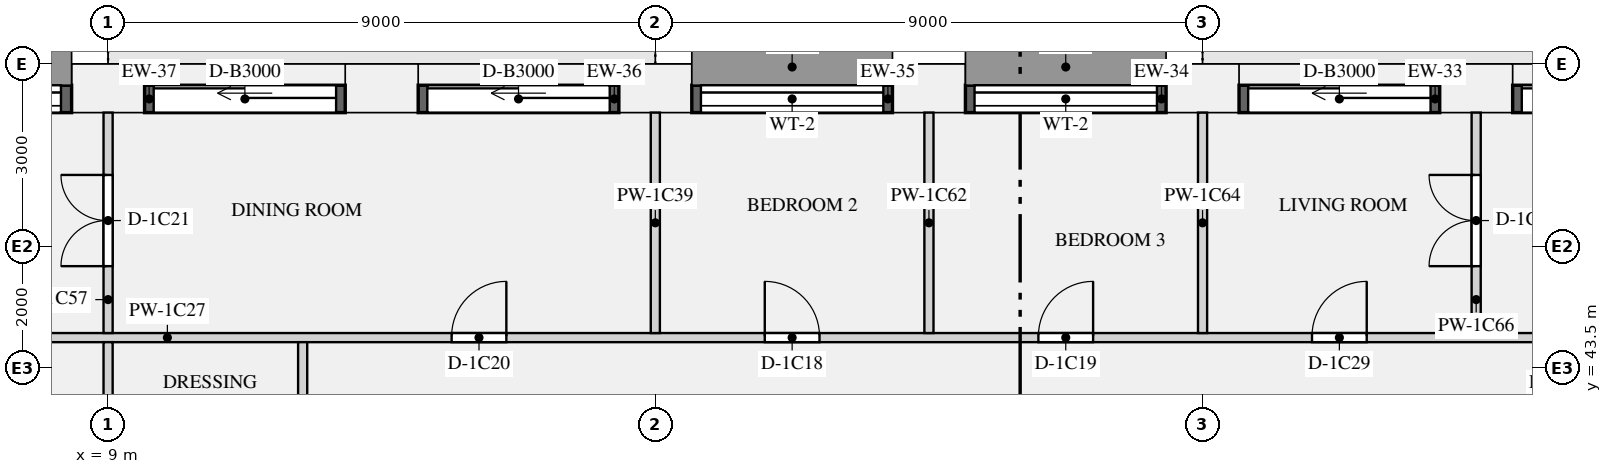
"""IFC4 building model, lengths in metres.
Left out: names, types, materials, properties, quantities, classifications, styles, units other than length and angle.
Written with IfcOpenShell. Run it as: python <this file> out.ifc"""

import sys

from ifc_helpers import new_model, si_unit, direction, frame, frame_2d, origin, origin_2d, place, context, subcontext, project, spatial, rectangle, extrude, element, fill, save


model = new_model("IFC4")
c1 = context("Model", 3, precision=1e-05, world=origin(), true_north=direction((0.0, 1.0)))
c2 = subcontext(c1, "Body", "Model", "MODEL_VIEW")
j1 = project(units=[si_unit("LENGTHUNIT", "METRE"), si_unit("PLANEANGLEUNIT", "RADIAN")], contexts=[c1])
p1 = place(None, origin())
s1 = spatial("IfcSite", under=j1, at=p1, CompositionType="ELEMENT")
p2 = place(p1, origin())
s2 = spatial("IfcBuilding", under=s1, at=p2, CompositionType="ELEMENT")
p3 = place(p2, frame((0.0, 0.0, 38.4)))
s3 = spatial("IfcBuildingStorey", under=s2, at=p3, CompositionType="ELEMENT", Elevation=38.4)
for number, where, z_axis, x_axis in (
    (1, (31.5, 48.1, 0.0), (0.0, 0.0, 1.0), (-1.0, 0.0, 0.0)),
    (2, (27.0, 48.1, 0.0), (0.0, 0.0, 1.0), (-1.0, 0.0, 0.0)),
    (3, (22.5, 48.1, 0.0), (0.0, 0.0, 1.0), (-1.0, 0.0, 0.0)),
    (4, (18.0, 48.1, 0.0), (0.0, 0.0, 1.0), (-1.0, 0.0, 0.0)),
    (5, (13.5, 48.1, 0.0), (0.0, 0.0, 1.0), (-1.0, 0.0, 0.0)),
    (6, (9.0, 48.1, 0.0), (0.0, 0.0, 1.0), (-1.0, 0.0, 0.0)),
):
    element("IfcColumn", number, at=place(p3, frame(where, z_axis=z_axis, x_axis=x_axis)), inside=s3, PredefinedType="USERDEFINED", context=c2, shape_type="SweptSolid", body=[
        extrude(rectangle(XDim=1.2, YDim=0.8, at=origin_2d()), origin(), (0.0, 0.0, 1.0), 3.15),
    ])
p4 = place(p3, frame((35.4, 47.925, 0.0), z_axis=(0.0, 0.0, 1.0), x_axis=(-1.0, 0.0, 0.0)))
e7 = element("IfcWall", 7, at=p4, inside=s3, PredefinedType="SOLIDWALL", context=c2, shape_type="SweptSolid", body=[
    extrude(rectangle(XDim=3.3, YDim=0.45, at=frame_2d((1.65, 0.0))), origin(), (0.0, 0.0, 1.0), 2.83),
])
p5 = place(p4, frame((0.15, 0.0, 0.0)))
e8 = element("IfcOpeningElement", 8, at=p5, cuts=e7, PredefinedType="OPENING", context=c2, shape_type="SweptSolid", body=[
    extrude(rectangle(XDim=3.0, YDim=2.3, at=frame_2d((1.5, 1.15))), frame((0.0, 0.235, 0.0), z_axis=(0.0, -1.0, 0.0), x_axis=(1.0, 0.0, 0.0)), (0.0, 0.0, 1.0), 0.47),
])
p6 = place(p3, frame((30.9, 47.925, 0.0), z_axis=(0.0, 0.0, 1.0), x_axis=(-1.0, 0.0, 0.0)))
e9 = element("IfcWall", 9, at=p6, inside=s3, PredefinedType="SOLIDWALL", context=c2, shape_type="SweptSolid", body=[
    extrude(rectangle(XDim=3.3, YDim=0.45, at=frame_2d((1.65, 0.0))), origin(), (0.0, 0.0, 1.0), 2.83),
])
p7 = place(p6, frame((0.15, 0.0, 0.0)))
e10 = element("IfcOpeningElement", 10, at=p7, cuts=e9, PredefinedType="OPENING", context=c2, shape_type="SweptSolid", body=[
    extrude(rectangle(XDim=3.0, YDim=2.3, at=frame_2d((1.5, 1.15))), frame((0.0, 0.235, 0.0), z_axis=(0.0, -1.0, 0.0), x_axis=(1.0, 0.0, 0.0)), (0.0, 0.0, 1.0), 0.47),
])
p8 = place(p3, frame((26.4, 47.925, 0.9), z_axis=(0.0, 0.0, 1.0), x_axis=(-1.0, 0.0, 0.0)))
e11 = element("IfcWall", 11, at=p8, inside=s3, PredefinedType="SOLIDWALL", context=c2, shape_type="SweptSolid", body=[
    extrude(rectangle(XDim=3.3, YDim=0.45, at=frame_2d((1.65, 0.0))), origin(), (0.0, 0.0, 1.0), 1.93),
])
p9 = place(p8, frame((0.15, 0.0, 0.15)))
e12 = element("IfcOpeningElement", 12, at=p9, cuts=e11, PredefinedType="OPENING", context=c2, shape_type="SweptSolid", body=[
    extrude(rectangle(XDim=3.0, YDim=1.5, at=frame_2d((1.5, 0.75))), frame((0.0, 0.235, 0.0), z_axis=(0.0, -1.0, 0.0), x_axis=(1.0, 0.0, 0.0)), (0.0, 0.0, 1.0), 0.47),
])
p10 = place(p3, frame((21.9, 47.925, 0.9), z_axis=(0.0, 0.0, 1.0), x_axis=(-1.0, 0.0, 0.0)))
e13 = element("IfcWall", 13, at=p10, inside=s3, PredefinedType="SOLIDWALL", context=c2, shape_type="SweptSolid", body=[
    extrude(rectangle(XDim=3.3, YDim=0.45, at=frame_2d((1.65, 0.0))), origin(), (0.0, 0.0, 1.0), 1.93),
])
p11 = place(p10, frame((0.15, 0.0, 0.15)))
e14 = element("IfcOpeningElement", 14, at=p11, cuts=e13, PredefinedType="OPENING", context=c2, shape_type="SweptSolid", body=[
    extrude(rectangle(XDim=3.0, YDim=1.5, at=frame_2d((1.5, 0.75))), frame((0.0, 0.235, 0.0), z_axis=(0.0, -1.0, 0.0), x_axis=(1.0, 0.0, 0.0)), (0.0, 0.0, 1.0), 0.47),
])
p12 = place(p3, frame((17.4, 47.925, 0.0), z_axis=(0.0, 0.0, 1.0), x_axis=(-1.0, 0.0, 0.0)))
e15 = element("IfcWall", 15, at=p12, inside=s3, PredefinedType="SOLIDWALL", context=c2, shape_type="SweptSolid", body=[
    extrude(rectangle(XDim=3.3, YDim=0.45, at=frame_2d((1.65, 0.0))), origin(), (0.0, 0.0, 1.0), 2.83),
])
p13 = place(p12, frame((0.15, 0.0, 0.0)))
e16 = element("IfcOpeningElement", 16, at=p13, cuts=e15, PredefinedType="OPENING", context=c2, shape_type="SweptSolid", body=[
    extrude(rectangle(XDim=3.0, YDim=2.3, at=frame_2d((1.5, 1.15))), frame((0.0, 0.235, 0.0), z_axis=(0.0, -1.0, 0.0), x_axis=(1.0, 0.0, 0.0)), (0.0, 0.0, 1.0), 0.47),
])
p14 = place(p3, frame((12.9, 47.925, 0.0), z_axis=(0.0, 0.0, 1.0), x_axis=(-1.0, 0.0, 0.0)))
e17 = element("IfcWall", 17, at=p14, inside=s3, PredefinedType="SOLIDWALL", context=c2, shape_type="SweptSolid", body=[
    extrude(rectangle(XDim=3.3, YDim=0.45, at=frame_2d((1.65, 0.0))), origin(), (0.0, 0.0, 1.0), 2.83),
])
p15 = place(p14, frame((0.15, 0.0, 0.0)))
e18 = element("IfcOpeningElement", 18, at=p15, cuts=e17, PredefinedType="OPENING", context=c2, shape_type="SweptSolid", body=[
    extrude(rectangle(XDim=3.0, YDim=2.3, at=frame_2d((1.5, 1.15))), frame((0.0, 0.235, 0.0), z_axis=(0.0, -1.0, 0.0), x_axis=(1.0, 0.0, 0.0)), (0.0, 0.0, 1.0), 0.47),
])
p16 = place(p3, frame((8.4, 47.925, 0.9), z_axis=(0.0, 0.0, 1.0), x_axis=(-1.0, 0.0, 0.0)))
e19 = element("IfcWall", 19, at=p16, inside=s3, PredefinedType="SOLIDWALL", context=c2, shape_type="SweptSolid", body=[
    extrude(rectangle(XDim=3.1, YDim=0.45, at=frame_2d((1.55, 0.0))), origin(), (0.0, 0.0, 1.0), 1.93),
])
p17 = place(p16, frame((0.175, 0.0, 0.15)))
e20 = element("IfcOpeningElement", 20, at=p17, cuts=e19, PredefinedType="OPENING", context=c2, shape_type="SweptSolid", body=[
    extrude(rectangle(XDim=2.75, YDim=1.5, at=frame_2d((1.375, 0.75))), frame((0.0, 0.235, 0.0), z_axis=(0.0, -1.0, 0.0), x_axis=(1.0, 0.0, 0.0)), (0.0, 0.0, 1.0), 0.47),
])
p18 = place(p3, frame((5.3, 44.0, 0.0), z_axis=(0.0, 0.0, 1.0), x_axis=(1.0, 0.0, 0.0)))
e21 = element("IfcWall", 21, at=p18, inside=s3, PredefinedType="PARTITIONING", context=c2, shape_type="SweptSolid", body=[
    extrude(rectangle(XDim=27.775, YDim=0.15, at=frame_2d((13.887, 0.0))), origin(), (0.0, 0.0, 1.0), 2.83),
])
p19 = place(p18, frame((14.5, 0.0, 0.0)))
e22 = element("IfcOpeningElement", 22, at=p19, cuts=e21, PredefinedType="OPENING", context=c2, shape_type="SweptSolid", body=[
    extrude(rectangle(XDim=0.9, YDim=2.1, at=frame_2d((0.45, 1.05))), frame((0.0, 0.085, 0.0), z_axis=(0.0, -1.0, 0.0), x_axis=(1.0, 0.0, 0.0)), (0.0, 0.0, 1.0), 0.17),
])
p20 = place(p18, frame((19.0, 0.0, 0.0)))
e23 = element("IfcOpeningElement", 23, at=p20, cuts=e21, PredefinedType="OPENING", context=c2, shape_type="SweptSolid", body=[
    extrude(rectangle(XDim=0.9, YDim=2.1, at=frame_2d((0.45, 1.05))), frame((0.0, 0.085, 0.0), z_axis=(0.0, -1.0, 0.0), x_axis=(1.0, 0.0, 0.0)), (0.0, 0.0, 1.0), 0.17),
])
p21 = place(p18, frame((9.35, 0.0, 0.0)))
e24 = element("IfcOpeningElement", 24, at=p21, cuts=e21, PredefinedType="OPENING", context=c2, shape_type="SweptSolid", body=[
    extrude(rectangle(XDim=0.9, YDim=2.1, at=frame_2d((0.45, 1.05))), frame((0.0, 0.085, 0.0), z_axis=(0.0, -1.0, 0.0), x_axis=(1.0, 0.0, 0.0)), (0.0, 0.0, 1.0), 0.17),
])
p22 = place(p18, frame((23.5, 0.0, 0.0)))
e25 = element("IfcOpeningElement", 25, at=p22, cuts=e21, PredefinedType="OPENING", context=c2, shape_type="SweptSolid", body=[
    extrude(rectangle(XDim=0.9, YDim=2.1, at=frame_2d((0.45, 1.05))), frame((0.0, 0.085, 0.0), z_axis=(0.0, -1.0, 0.0), x_axis=(1.0, 0.0, 0.0)), (0.0, 0.0, 1.0), 0.17),
])
p23 = place(p3, frame((18.0, 44.075, 0.0), z_axis=(0.0, 0.0, 1.0), x_axis=(0.0, 1.0, 0.0)))
e26 = element("IfcWall", 26, at=p23, inside=s3, PredefinedType="PARTITIONING", context=c2, shape_type="SweptSolid", body=[
    extrude(rectangle(XDim=3.625, YDim=0.15, at=frame_2d((1.812, 0.0))), origin(), (0.0, 0.0, 1.0), 2.83),
])
p24 = place(p3, frame((9.0, 36.35, 0.0), z_axis=(0.0, 0.0, 1.0), x_axis=(0.0, 1.0, 0.0)))
e27 = element("IfcWall", 27, at=p24, inside=s3, PredefinedType="PARTITIONING", context=c2, shape_type="SweptSolid", body=[
    extrude(rectangle(XDim=7.575, YDim=0.15, at=frame_2d((3.788, 0.0))), origin(), (0.0, 0.0, 1.0), 2.83),
])
p25 = place(p24, frame((5.312, 0.0, 0.0)))
e28 = element("IfcOpeningElement", 28, at=p25, cuts=e27, PredefinedType="OPENING", context=c2, shape_type="SweptSolid", body=[
    extrude(rectangle(XDim=0.8, YDim=2.1, at=frame_2d((0.4, 1.05))), frame((0.0, 0.085, 0.0), z_axis=(0.0, -1.0, 0.0), x_axis=(1.0, 0.0, 0.0)), (0.0, 0.0, 1.0), 0.17),
])
p26 = place(p24, frame((1.438, 0.0, 0.0)))
e29 = element("IfcOpeningElement", 29, at=p26, cuts=e27, PredefinedType="OPENING", context=c2, shape_type="SweptSolid", body=[
    extrude(rectangle(XDim=0.8, YDim=2.1, at=frame_2d((0.4, 1.05))), frame((0.0, 0.085, 0.0), z_axis=(0.0, -1.0, 0.0), x_axis=(1.0, 0.0, 0.0)), (0.0, 0.0, 1.0), 0.17),
])
p27 = place(p3, frame((9.0, 44.075, 0.0), z_axis=(0.0, 0.0, 1.0), x_axis=(0.0, 1.0, 0.0)))
e30 = element("IfcWall", 30, at=p27, inside=s3, PredefinedType="PARTITIONING", context=c2, shape_type="SweptSolid", body=[
    extrude(rectangle(XDim=3.625, YDim=0.15, at=frame_2d((1.812, 0.0))), origin(), (0.0, 0.0, 1.0), 2.83),
])
p28 = place(p27, frame((1.1, 0.0, 0.0)))
e31 = element("IfcOpeningElement", 31, at=p28, cuts=e30, PredefinedType="OPENING", context=c2, shape_type="SweptSolid", body=[
    extrude(rectangle(XDim=1.5, YDim=2.1, at=frame_2d((0.75, 1.05))), frame((0.0, 0.085, 0.0), z_axis=(0.0, -1.0, 0.0), x_axis=(1.0, 0.0, 0.0)), (0.0, 0.0, 1.0), 0.17),
])
p29 = place(p3, frame((12.2, 36.35, 0.0), z_axis=(0.0, 0.0, 1.0), x_axis=(0.0, 1.0, 0.0)))
e32 = element("IfcWall", 32, at=p29, inside=s3, PredefinedType="PARTITIONING", context=c2, shape_type="SweptSolid", body=[
    extrude(rectangle(XDim=7.575, YDim=0.15, at=frame_2d((3.788, 0.0))), origin(), (0.0, 0.0, 1.0), 2.83),
])
p30 = place(p29, frame((5.312, 0.0, 0.0)))
e33 = element("IfcOpeningElement", 33, at=p30, cuts=e32, PredefinedType="OPENING", context=c2, shape_type="SweptSolid", body=[
    extrude(rectangle(XDim=0.8, YDim=2.1, at=frame_2d((0.4, 1.05))), frame((0.0, 0.085, 0.0), z_axis=(0.0, -1.0, 0.0), x_axis=(1.0, 0.0, 0.0)), (0.0, 0.0, 1.0), 0.17),
])
for number, where, z_axis, x_axis in (
    (34, (22.5, 44.075, 0.0), (0.0, 0.0, 1.0), (0.0, 1.0, 0.0)),
    (35, (27.0, 44.075, 0.0), (0.0, 0.0, 1.0), (0.0, 1.0, 0.0)),
):
    element("IfcWall", number, at=place(p3, frame(where, z_axis=z_axis, x_axis=x_axis)), inside=s3, PredefinedType="PARTITIONING", context=c2, shape_type="SweptSolid", body=[
        extrude(rectangle(XDim=3.625, YDim=0.15, at=frame_2d((1.812, 0.0))), origin(), (0.0, 0.0, 1.0), 2.83),
    ])
p31 = place(p3, frame((31.5, 44.075, 0.0), z_axis=(0.0, 0.0, 1.0), x_axis=(0.0, 1.0, 0.0)))
e36 = element("IfcWall", 36, at=p31, inside=s3, PredefinedType="PARTITIONING", context=c2, shape_type="SweptSolid", body=[
    extrude(rectangle(XDim=3.625, YDim=0.15, at=frame_2d((1.812, 0.0))), origin(), (0.0, 0.0, 1.0), 2.83),
])
p32 = place(p31, frame((1.1, 0.0, 0.0)))
e37 = element("IfcOpeningElement", 37, at=p32, cuts=e36, PredefinedType="OPENING", context=c2, shape_type="SweptSolid", body=[
    extrude(rectangle(XDim=1.5, YDim=2.1, at=frame_2d((0.75, 1.05))), frame((0.0, 0.085, 0.0), z_axis=(0.0, -1.0, 0.0), x_axis=(1.0, 0.0, 0.0)), (0.0, 0.0, 1.0), 0.17),
])
p33 = place(p5, origin())
e38 = element("IfcDoor", 38, at=p33, inside=s3, OperationType="SLIDING_TO_LEFT", PredefinedType="DOOR", context=c2, shape_type="SweptSolid", body=[
    extrude(rectangle(XDim=3.0, YDim=2.3, at=frame_2d((1.5, 1.15))), frame((0.0, -0.07, 0.0), z_axis=(0.0, -1.0, 0.0), x_axis=(1.0, 0.0, 0.0)), (0.0, 0.0, 1.0), 0.05),
])
fill(e8, e38)
p34 = place(p7, origin())
e39 = element("IfcDoor", 39, at=p34, inside=s3, OperationType="SLIDING_TO_LEFT", PredefinedType="DOOR", context=c2, shape_type="SweptSolid", body=[
    extrude(rectangle(XDim=3.0, YDim=2.3, at=frame_2d((1.5, 1.15))), frame((0.0, -0.07, 0.0), z_axis=(0.0, -1.0, 0.0), x_axis=(1.0, 0.0, 0.0)), (0.0, 0.0, 1.0), 0.05),
])
fill(e10, e39)
p35 = place(p9, origin())
e40 = element("IfcWindow", 40, at=p35, inside=s3, PartitioningType="SINGLE_PANEL", PredefinedType="WINDOW", context=c2, shape_type="SweptSolid", body=[
    extrude(rectangle(XDim=3.0, YDim=1.5, at=frame_2d((1.5, 0.75))), frame((0.0, -0.065, 0.0), z_axis=(0.0, -1.0, 0.0), x_axis=(1.0, 0.0, 0.0)), (0.0, 0.0, 1.0), 0.06),
])
fill(e12, e40)
p36 = place(p11, origin())
e41 = element("IfcWindow", 41, at=p36, inside=s3, PartitioningType="SINGLE_PANEL", PredefinedType="WINDOW", context=c2, shape_type="SweptSolid", body=[
    extrude(rectangle(XDim=3.0, YDim=1.5, at=frame_2d((1.5, 0.75))), frame((0.0, -0.065, 0.0), z_axis=(0.0, -1.0, 0.0), x_axis=(1.0, 0.0, 0.0)), (0.0, 0.0, 1.0), 0.06),
])
fill(e14, e41)
p37 = place(p13, origin())
e42 = element("IfcDoor", 42, at=p37, inside=s3, OperationType="SLIDING_TO_LEFT", PredefinedType="DOOR", context=c2, shape_type="SweptSolid", body=[
    extrude(rectangle(XDim=3.0, YDim=2.3, at=frame_2d((1.5, 1.15))), frame((0.0, -0.07, 0.0), z_axis=(0.0, -1.0, 0.0), x_axis=(1.0, 0.0, 0.0)), (0.0, 0.0, 1.0), 0.05),
])
fill(e16, e42)
p38 = place(p15, origin())
e43 = element("IfcDoor", 43, at=p38, inside=s3, OperationType="SLIDING_TO_LEFT", PredefinedType="DOOR", context=c2, shape_type="SweptSolid", body=[
    extrude(rectangle(XDim=3.0, YDim=2.3, at=frame_2d((1.5, 1.15))), frame((0.0, -0.07, 0.0), z_axis=(0.0, -1.0, 0.0), x_axis=(1.0, 0.0, 0.0)), (0.0, 0.0, 1.0), 0.05),
])
fill(e18, e43)
p39 = place(p17, origin())
e44 = element("IfcWindow", 44, at=p39, inside=s3, PartitioningType="SINGLE_PANEL", PredefinedType="WINDOW", context=c2, shape_type="SweptSolid", body=[
    extrude(rectangle(XDim=2.75, YDim=1.5, at=frame_2d((1.375, 0.75))), frame((0.0, -0.065, 0.0), z_axis=(0.0, -1.0, 0.0), x_axis=(1.0, 0.0, 0.0)), (0.0, 0.0, 1.0), 0.06),
])
fill(e20, e44)
p40 = place(p19, origin())
e45 = element("IfcDoor", 45, at=p40, inside=s3, OperationType="SINGLE_SWING_LEFT", PredefinedType="DOOR", context=c2, shape_type="SweptSolid", body=[
    extrude(rectangle(XDim=0.9, YDim=2.1, at=frame_2d((0.45, 1.05))), frame((0.0, 0.025, 0.0), z_axis=(0.0, -1.0, 0.0), x_axis=(1.0, 0.0, 0.0)), (0.0, 0.0, 1.0), 0.05),
])
fill(e22, e45)
p41 = place(p20, origin())
e46 = element("IfcDoor", 46, at=p41, inside=s3, OperationType="SINGLE_SWING_RIGHT", PredefinedType="DOOR", context=c2, shape_type="SweptSolid", body=[
    extrude(rectangle(XDim=0.9, YDim=2.1, at=frame_2d((0.45, 1.05))), frame((0.0, 0.025, 0.0), z_axis=(0.0, -1.0, 0.0), x_axis=(1.0, 0.0, 0.0)), (0.0, 0.0, 1.0), 0.05),
])
fill(e23, e46)
p42 = place(p21, origin())
e47 = element("IfcDoor", 47, at=p42, inside=s3, OperationType="SINGLE_SWING_RIGHT", PredefinedType="DOOR", context=c2, shape_type="SweptSolid", body=[
    extrude(rectangle(XDim=0.9, YDim=2.1, at=frame_2d((0.45, 1.05))), frame((0.0, 0.025, 0.0), z_axis=(0.0, -1.0, 0.0), x_axis=(1.0, 0.0, 0.0)), (0.0, 0.0, 1.0), 0.05),
])
fill(e24, e47)
p43 = place(p28, origin())
e48 = element("IfcDoor", 48, at=p43, inside=s3, OperationType="DOUBLE_DOOR_SINGLE_SWING", PredefinedType="DOOR", context=c2, shape_type="SweptSolid", body=[
    extrude(rectangle(XDim=1.5, YDim=2.1, at=frame_2d((0.75, 1.05))), frame((0.0, 0.025, 0.0), z_axis=(0.0, -1.0, 0.0), x_axis=(1.0, 0.0, 0.0)), (0.0, 0.0, 1.0), 0.05),
])
fill(e31, e48)
p44 = place(p32, origin())
e49 = element("IfcDoor", 49, at=p44, inside=s3, OperationType="DOUBLE_DOOR_SINGLE_SWING", PredefinedType="DOOR", context=c2, shape_type="SweptSolid", body=[
    extrude(rectangle(XDim=1.5, YDim=2.1, at=frame_2d((0.75, 1.05))), frame((0.0, 0.025, 0.0), z_axis=(0.0, -1.0, 0.0), x_axis=(1.0, 0.0, 0.0)), (0.0, 0.0, 1.0), 0.05),
])
fill(e37, e49)
p45 = place(p22, origin())
e50 = element("IfcDoor", 50, at=p45, inside=s3, OperationType="SINGLE_SWING_RIGHT", PredefinedType="DOOR", context=c2, shape_type="SweptSolid", body=[
    extrude(rectangle(XDim=0.9, YDim=2.1, at=frame_2d((0.45, 1.05))), frame((0.0, 0.025, 0.0), z_axis=(0.0, -1.0, 0.0), x_axis=(1.0, 0.0, 0.0)), (0.0, 0.0, 1.0), 0.05),
])
fill(e25, e50)
save(model, sys.argv[1])
